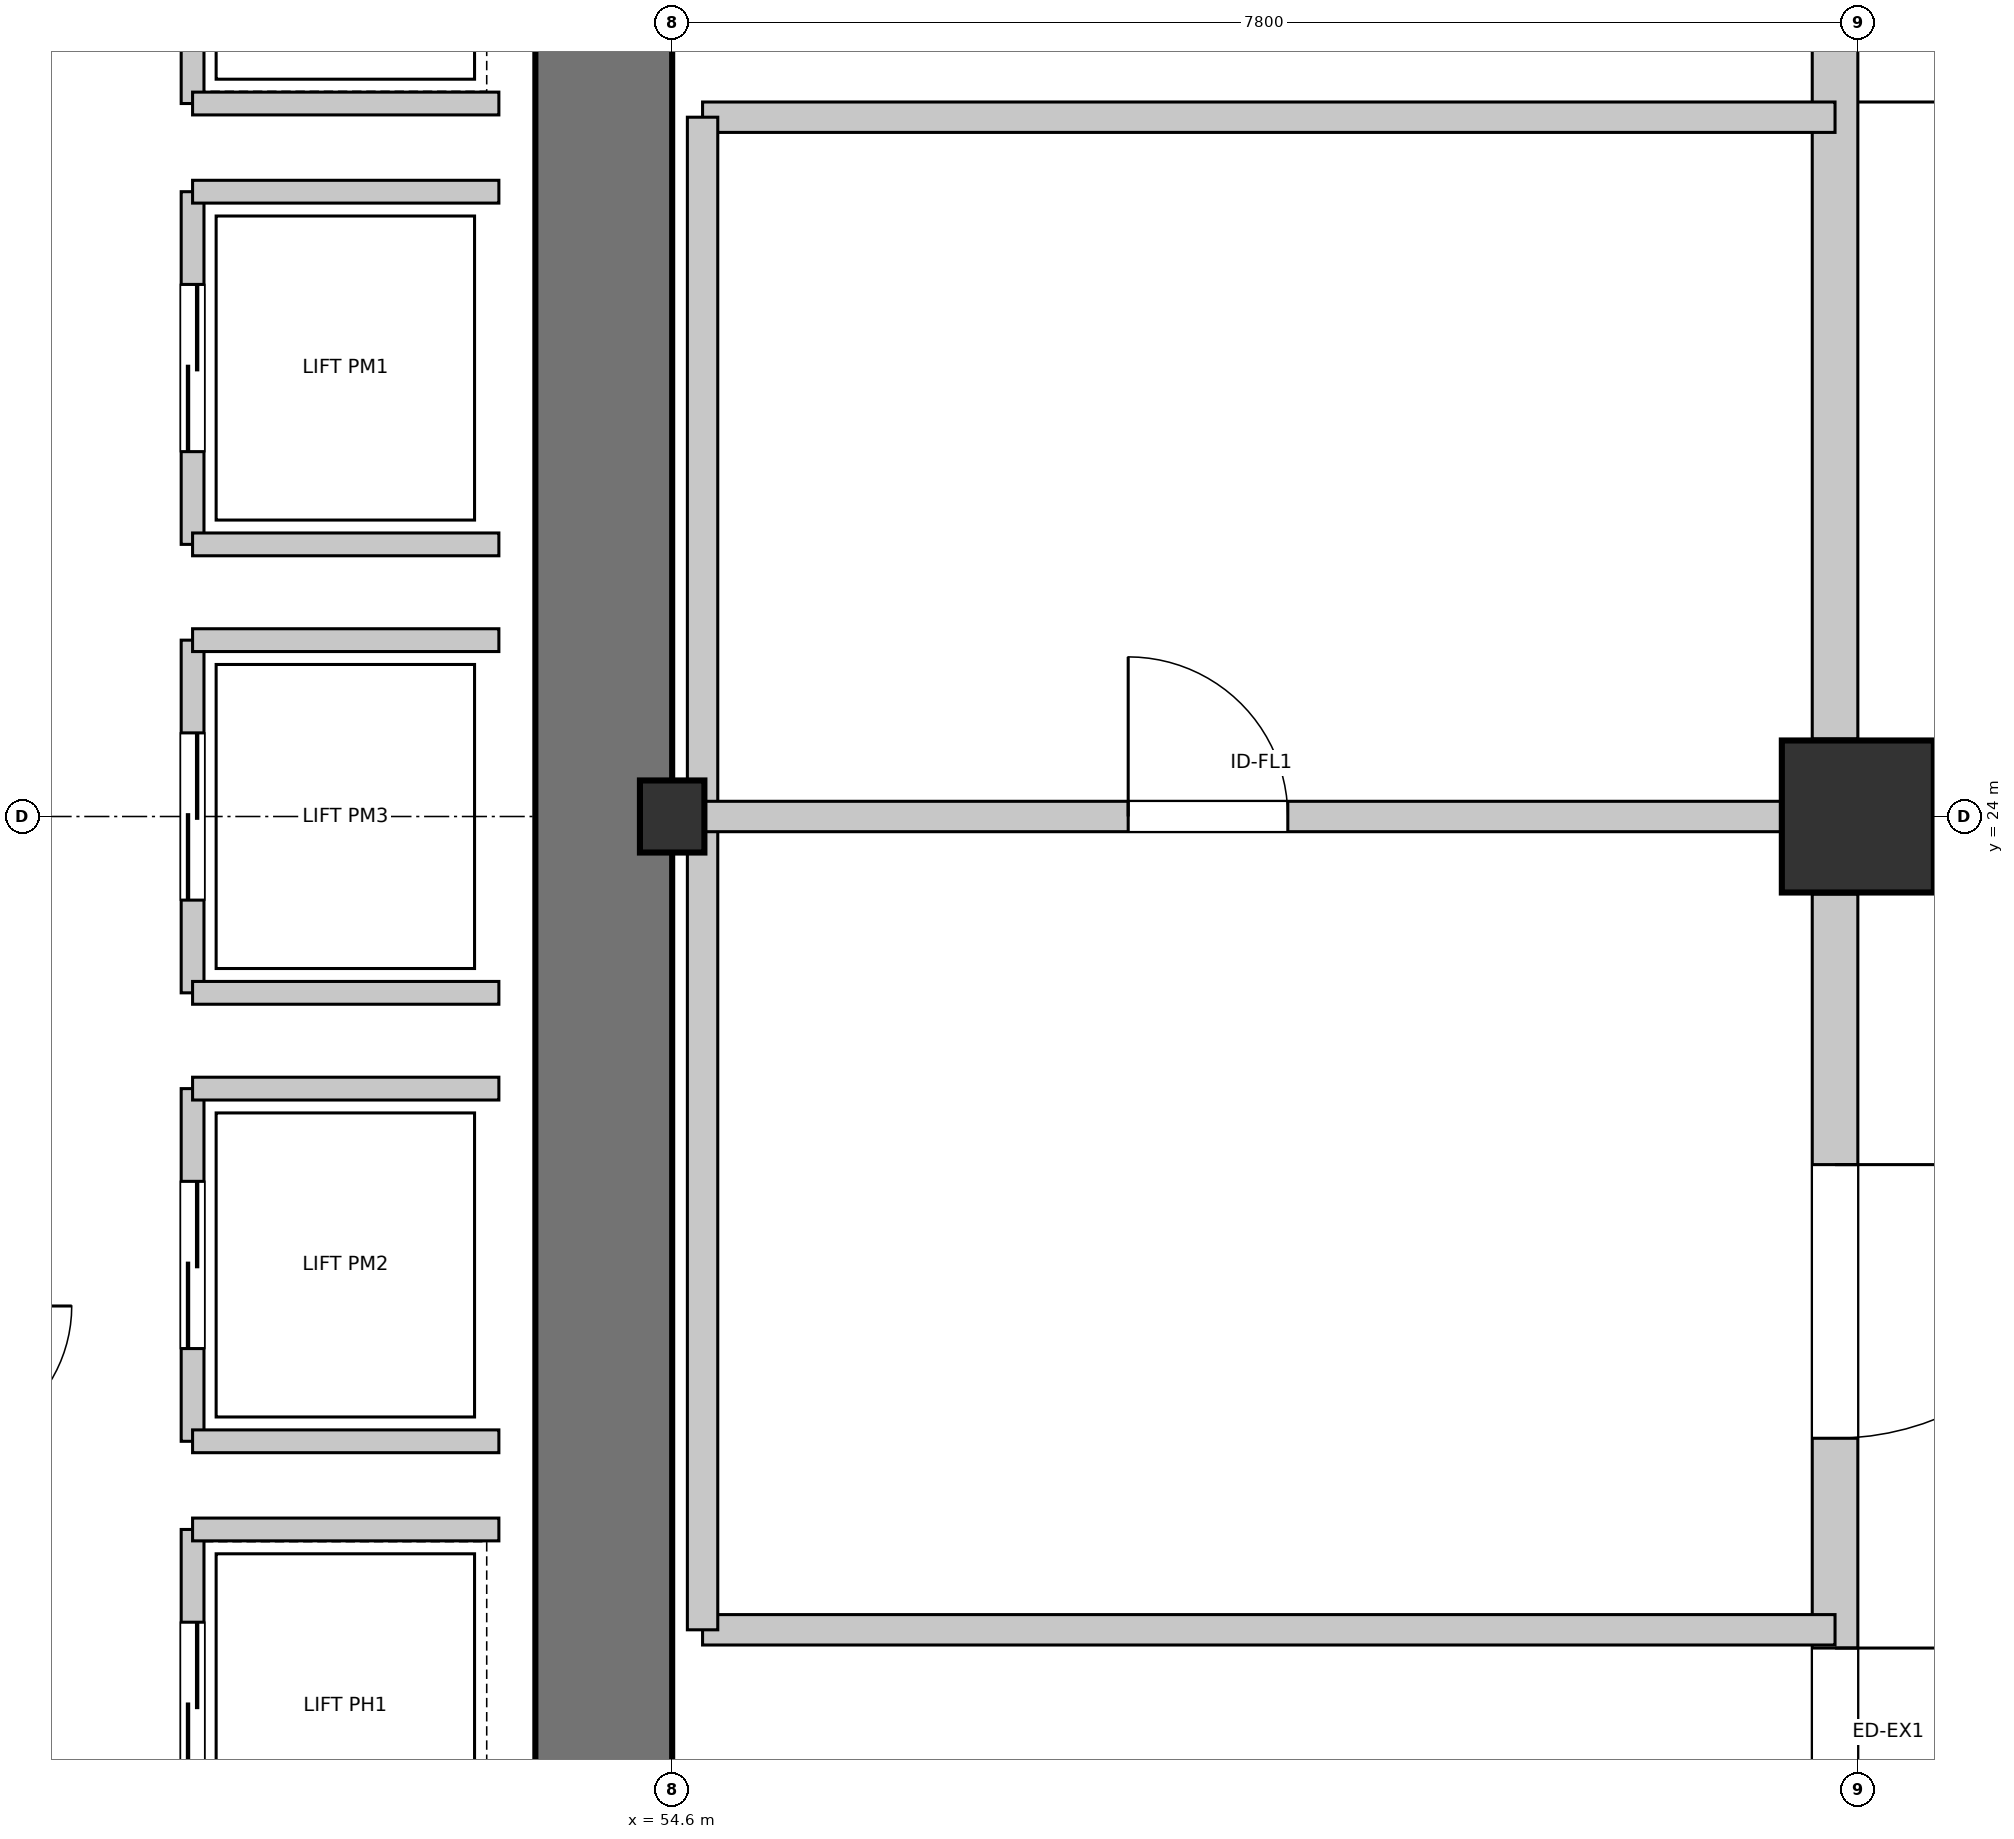
"""IFC4 building model, lengths in metres.
Left out: names, types, materials, properties, quantities, classifications, styles, units other than length and angle.
Written with IfcOpenShell. Run it as: python <this file> out.ifc"""

import sys

from ifc_helpers import new_model, si_unit, direction, frame, frame_2d, origin, origin_2d, place, context, subcontext, project, spatial, rectangle, i_section, extrude, element, fill, save


model = new_model("IFC4")
c1 = context("Model", 3, precision=1e-05, world=origin(), true_north=direction((0.0, 1.0)))
c2 = subcontext(c1, "Body", "Model", "MODEL_VIEW")
j1 = project(units=[si_unit("LENGTHUNIT", "METRE"), si_unit("PLANEANGLEUNIT", "RADIAN")], contexts=[c1])
p1 = place(None, origin())
s1 = spatial("IfcSite", under=j1, at=p1, CompositionType="ELEMENT")
p2 = place(p1, origin())
s2 = spatial("IfcBuilding", under=s1, at=p2, CompositionType="ELEMENT")
p3 = place(p2, origin())
s3 = spatial("IfcBuildingStorey", under=s2, at=p3, CompositionType="ELEMENT", Elevation=0.0)
p4 = place(p3, frame((54.15, 16.45, 0.0), z_axis=(0.0, 0.0, 1.0), x_axis=(0.0, 1.0, 0.0)))
e1 = element("IfcWall", 1, at=p4, inside=s3, PredefinedType="SHEAR", context=c2, shape_type="SweptSolid", body=[
    extrude(rectangle(XDim=15.1, YDim=0.9, at=frame_2d((7.55, 0.0))), origin(), (0.0, 0.0, 1.0), 5.12),
])
p5 = place(p3, frame((54.6, 24.0, 0.0), z_axis=(0.0, 0.0, 1.0), x_axis=(1.0, 0.0, 0.0)))
e2 = element("IfcColumn", 2, at=p5, inside=s3, PredefinedType="COLUMN", context=c2, shape_type="SweptSolid", body=[
    extrude(i_section(OverallWidth=0.424, OverallDepth=0.474, WebThickness=0.048, FlangeThickness=0.077, at=origin_2d()), origin(), (0.0, 0.0, 1.0), 5.395),
])
p6 = place(p3, frame((62.4, 24.0, 0.0), z_axis=(0.0, 0.0, 1.0), x_axis=(1.0, 0.0, 0.0)))
e3 = element("IfcColumn", 3, at=p6, inside=s3, PredefinedType="COLUMN", context=c2, shape_type="SweptSolid", body=[
    extrude(rectangle(XDim=1.0, YDim=1.0, at=origin_2d()), origin(), (0.0, 0.0, 1.0), 5.395),
])
p7 = place(p3, frame((62.25, 16.51, 0.0), z_axis=(0.0, 0.0, 1.0), x_axis=(0.0, 1.0, 0.0)))
e4 = element("IfcWall", 4, at=p7, inside=s3, PredefinedType="STANDARD", context=c2, shape_type="SweptSolid", body=[
    extrude(rectangle(XDim=6.98, YDim=0.3, at=frame_2d((3.49, 0.0))), origin(), (0.0, 0.0, 1.0), 4.648),
])
p8 = place(p7, frame((0.22, 0.0, 0.0)))
e5 = element("IfcOpeningElement", 5, at=p8, cuts=e4, PredefinedType="OPENING", context=c2, shape_type="SweptSolid", body=[
    extrude(rectangle(XDim=1.8, YDim=2.2, at=frame_2d((0.9, 1.1))), frame((0.0, 0.16, 0.0), z_axis=(0.0, -1.0, 0.0), x_axis=(1.0, 0.0, 0.0)), (0.0, 0.0, 1.0), 0.32),
])
p9 = place(p7, frame((3.4, 0.0, 0.0)))
e6 = element("IfcOpeningElement", 6, at=p9, cuts=e4, PredefinedType="OPENING", context=c2, shape_type="SweptSolid", body=[
    extrude(rectangle(XDim=1.8, YDim=2.2, at=frame_2d((0.9, 1.1))), frame((0.0, 0.16, 0.0), z_axis=(0.0, -1.0, 0.0), x_axis=(1.0, 0.0, 0.0)), (0.0, 0.0, 1.0), 0.32),
])
p10 = place(p3, frame((62.25, 24.51, 0.0), z_axis=(0.0, 0.0, 1.0), x_axis=(0.0, 1.0, 0.0)))
e7 = element("IfcWall", 7, at=p10, inside=s3, PredefinedType="STANDARD", context=c2, shape_type="SweptSolid", body=[
    extrude(rectangle(XDim=6.98, YDim=0.3, at=frame_2d((3.49, 0.0))), origin(), (0.0, 0.0, 1.0), 4.648),
])
p11 = place(p10, frame((4.55, 0.0, 0.0)))
e8 = element("IfcOpeningElement", 8, at=p11, cuts=e7, PredefinedType="OPENING", context=c2, shape_type="SweptSolid", body=[
    extrude(rectangle(XDim=1.8, YDim=2.2, at=frame_2d((0.9, 1.1))), frame((0.0, 0.16, 0.0), z_axis=(0.0, -1.0, 0.0), x_axis=(1.0, 0.0, 0.0)), (0.0, 0.0, 1.0), 0.32),
])
p12 = place(p3, frame((51.445, 28.69, 0.0), z_axis=(0.0, 0.0, 1.0), x_axis=(0.0, 1.0, 0.0)))
e9 = element("IfcWall", 9, at=p12, inside=s3, PredefinedType="PARTITIONING", context=c2, shape_type="SweptSolid", body=[
    extrude(rectangle(XDim=2.32, YDim=0.15, at=frame_2d((1.16, 0.0))), origin(), (0.0, 0.0, 1.0), 5.12),
])
p13 = place(p12, frame((0.61, 0.0, 0.0)))
e10 = element("IfcOpeningElement", 10, at=p13, cuts=e9, PredefinedType="OPENING", context=c2, shape_type="SweptSolid", body=[
    extrude(rectangle(XDim=1.1, YDim=2.15, at=frame_2d((0.55, 1.075))), frame((0.0, 0.085, 0.0), z_axis=(0.0, -1.0, 0.0), x_axis=(1.0, 0.0, 0.0)), (0.0, 0.0, 1.0), 0.17),
])
p14 = place(p3, frame((51.445, 28.69, 0.0), z_axis=(0.0, 0.0, 1.0), x_axis=(1.0, 0.0, 0.0)))
e11 = element("IfcWall", 11, at=p14, inside=s3, PredefinedType="PARTITIONING", context=c2, shape_type="SweptSolid", body=[
    extrude(rectangle(XDim=2.015, YDim=0.15, at=frame_2d((1.007, 0.0))), origin(), (0.0, 0.0, 1.0), 5.12),
])
p15 = place(p3, frame((51.445, 25.79, 0.0), z_axis=(0.0, 0.0, 1.0), x_axis=(0.0, 1.0, 0.0)))
e12 = element("IfcWall", 12, at=p15, inside=s3, PredefinedType="PARTITIONING", context=c2, shape_type="SweptSolid", body=[
    extrude(rectangle(XDim=2.32, YDim=0.15, at=frame_2d((1.16, 0.0))), origin(), (0.0, 0.0, 1.0), 5.12),
])
p16 = place(p15, frame((0.61, 0.0, 0.0)))
e13 = element("IfcOpeningElement", 13, at=p16, cuts=e12, PredefinedType="OPENING", context=c2, shape_type="SweptSolid", body=[
    extrude(rectangle(XDim=1.1, YDim=2.15, at=frame_2d((0.55, 1.075))), frame((0.0, 0.085, 0.0), z_axis=(0.0, -1.0, 0.0), x_axis=(1.0, 0.0, 0.0)), (0.0, 0.0, 1.0), 0.17),
])
for number, where, z_axis, x_axis in (
    (14, (51.445, 25.79, 0.0), (0.0, 0.0, 1.0), (1.0, 0.0, 0.0)),
    (15, (51.445, 28.11, 0.0), (0.0, 0.0, 1.0), (1.0, 0.0, 0.0)),
):
    element("IfcWall", number, at=place(p3, frame(where, z_axis=z_axis, x_axis=x_axis)), inside=s3, PredefinedType="PARTITIONING", context=c2, shape_type="SweptSolid", body=[
        extrude(rectangle(XDim=2.015, YDim=0.15, at=frame_2d((1.007, 0.0))), origin(), (0.0, 0.0, 1.0), 5.12),
    ])
p17 = place(p3, frame((51.445, 19.89, 0.0), z_axis=(0.0, 0.0, 1.0), x_axis=(0.0, 1.0, 0.0)))
e16 = element("IfcWall", 16, at=p17, inside=s3, PredefinedType="PARTITIONING", context=c2, shape_type="SweptSolid", body=[
    extrude(rectangle(XDim=2.32, YDim=0.15, at=frame_2d((1.16, 0.0))), origin(), (0.0, 0.0, 1.0), 5.12),
])
p18 = place(p17, frame((0.61, 0.0, 0.0)))
e17 = element("IfcOpeningElement", 17, at=p18, cuts=e16, PredefinedType="OPENING", context=c2, shape_type="SweptSolid", body=[
    extrude(rectangle(XDim=1.1, YDim=2.15, at=frame_2d((0.55, 1.075))), frame((0.0, 0.085, 0.0), z_axis=(0.0, -1.0, 0.0), x_axis=(1.0, 0.0, 0.0)), (0.0, 0.0, 1.0), 0.17),
])
for number, where, z_axis, x_axis in (
    (18, (51.445, 19.89, 0.0), (0.0, 0.0, 1.0), (1.0, 0.0, 0.0)),
    (19, (51.445, 22.21, 0.0), (0.0, 0.0, 1.0), (1.0, 0.0, 0.0)),
):
    element("IfcWall", number, at=place(p3, frame(where, z_axis=z_axis, x_axis=x_axis)), inside=s3, PredefinedType="PARTITIONING", context=c2, shape_type="SweptSolid", body=[
        extrude(rectangle(XDim=2.015, YDim=0.15, at=frame_2d((1.007, 0.0))), origin(), (0.0, 0.0, 1.0), 5.12),
    ])
p19 = place(p3, frame((51.445, 22.84, 0.0), z_axis=(0.0, 0.0, 1.0), x_axis=(0.0, 1.0, 0.0)))
e20 = element("IfcWall", 20, at=p19, inside=s3, PredefinedType="PARTITIONING", context=c2, shape_type="SweptSolid", body=[
    extrude(rectangle(XDim=2.32, YDim=0.15, at=frame_2d((1.16, 0.0))), origin(), (0.0, 0.0, 1.0), 5.12),
])
p20 = place(p19, frame((0.61, 0.0, 0.0)))
e21 = element("IfcOpeningElement", 21, at=p20, cuts=e20, PredefinedType="OPENING", context=c2, shape_type="SweptSolid", body=[
    extrude(rectangle(XDim=1.1, YDim=2.15, at=frame_2d((0.55, 1.075))), frame((0.0, 0.085, 0.0), z_axis=(0.0, -1.0, 0.0), x_axis=(1.0, 0.0, 0.0)), (0.0, 0.0, 1.0), 0.17),
])
for number, where, z_axis, x_axis in (
    (22, (51.445, 22.84, 0.0), (0.0, 0.0, 1.0), (1.0, 0.0, 0.0)),
    (23, (51.445, 25.16, 0.0), (0.0, 0.0, 1.0), (1.0, 0.0, 0.0)),
):
    element("IfcWall", number, at=place(p3, frame(where, z_axis=z_axis, x_axis=x_axis)), inside=s3, PredefinedType="PARTITIONING", context=c2, shape_type="SweptSolid", body=[
        extrude(rectangle(XDim=2.015, YDim=0.15, at=frame_2d((1.007, 0.0))), origin(), (0.0, 0.0, 1.0), 5.12),
    ])
p21 = place(p3, frame((51.445, 16.99, 0.0), z_axis=(0.0, 0.0, 1.0), x_axis=(0.0, 1.0, 0.0)))
e24 = element("IfcWall", 24, at=p21, inside=s3, PredefinedType="PARTITIONING", context=c2, shape_type="SweptSolid", body=[
    extrude(rectangle(XDim=2.32, YDim=0.15, at=frame_2d((1.16, 0.0))), origin(), (0.0, 0.0, 1.0), 5.12),
])
p22 = place(p21, frame((0.61, 0.0, 0.0)))
e25 = element("IfcOpeningElement", 25, at=p22, cuts=e24, PredefinedType="OPENING", context=c2, shape_type="SweptSolid", body=[
    extrude(rectangle(XDim=1.1, YDim=2.15, at=frame_2d((0.55, 1.075))), frame((0.0, 0.085, 0.0), z_axis=(0.0, -1.0, 0.0), x_axis=(1.0, 0.0, 0.0)), (0.0, 0.0, 1.0), 0.17),
])
p23 = place(p3, frame((51.445, 19.31, 0.0), z_axis=(0.0, 0.0, 1.0), x_axis=(1.0, 0.0, 0.0)))
e26 = element("IfcWall", 26, at=p23, inside=s3, PredefinedType="PARTITIONING", context=c2, shape_type="SweptSolid", body=[
    extrude(rectangle(XDim=2.015, YDim=0.15, at=frame_2d((1.007, 0.0))), origin(), (0.0, 0.0, 1.0), 5.12),
])
for number, where, z_axis, x_axis in (
    (27, (54.8, 28.6, 0.0), (0.0, 0.0, 1.0), (1.0, 0.0, 0.0)),
    (28, (54.8, 18.65, 0.0), (0.0, 0.0, 1.0), (1.0, 0.0, 0.0)),
):
    element("IfcWall", number, at=place(p3, frame(where, z_axis=z_axis, x_axis=x_axis)), inside=s3, PredefinedType="SOLIDWALL", context=c2, shape_type="SweptSolid", body=[
        extrude(rectangle(XDim=7.45, YDim=0.2, at=frame_2d((3.725, 0.0))), origin(), (0.0, 0.0, 1.0), 5.12),
    ])
p24 = place(p3, frame((54.8, 18.65, 0.0), z_axis=(0.0, 0.0, 1.0), x_axis=(0.0, 1.0, 0.0)))
e29 = element("IfcWall", 29, at=p24, inside=s3, PredefinedType="SOLIDWALL", context=c2, shape_type="SweptSolid", body=[
    extrude(rectangle(XDim=9.95, YDim=0.2, at=frame_2d((4.975, 0.0))), origin(), (0.0, 0.0, 1.0), 4.338),
])
p25 = place(p3, frame((54.8, 24.0, 0.0), z_axis=(0.0, 0.0, 1.0), x_axis=(1.0, 0.0, 0.0)))
e30 = element("IfcWall", 30, at=p25, inside=s3, PredefinedType="SOLIDWALL", context=c2, shape_type="SweptSolid", body=[
    extrude(rectangle(XDim=7.45, YDim=0.2, at=frame_2d((3.725, 0.0))), origin(), (0.0, 0.0, 1.0), 4.338),
])
p26 = place(p25, frame((2.8, 0.0, 0.0)))
e31 = element("IfcOpeningElement", 31, at=p26, cuts=e30, PredefinedType="OPENING", context=c2, shape_type="SweptSolid", body=[
    extrude(rectangle(XDim=1.05, YDim=2.15, at=frame_2d((0.525, 1.075))), frame((0.0, 0.11, 0.0), z_axis=(0.0, -1.0, 0.0), x_axis=(1.0, 0.0, 0.0)), (0.0, 0.0, 1.0), 0.22),
])
p27 = place(p8, frame((1.8, 0.0, 0.0), z_axis=(0.0, 0.0, 1.0), x_axis=(-1.0, 0.0, 0.0)))
e32 = element("IfcDoor", 32, at=p27, inside=s3, OperationType="SINGLE_SWING_LEFT", PredefinedType="DOOR", context=c2, shape_type="SweptSolid", body=[
    extrude(rectangle(XDim=1.8, YDim=2.2, at=frame_2d((0.9, 1.1))), frame((0.0, 0.025, 0.0), z_axis=(0.0, -1.0, 0.0), x_axis=(1.0, 0.0, 0.0)), (0.0, 0.0, 1.0), 0.05),
])
fill(e5, e32)
p28 = place(p9, frame((1.8, 0.0, 0.0), z_axis=(0.0, 0.0, 1.0), x_axis=(-1.0, 0.0, 0.0)))
e33 = element("IfcDoor", 33, at=p28, inside=s3, OperationType="SINGLE_SWING_LEFT", PredefinedType="DOOR", context=c2, shape_type="SweptSolid", body=[
    extrude(rectangle(XDim=1.8, YDim=2.2, at=frame_2d((0.9, 1.1))), frame((0.0, 0.025, 0.0), z_axis=(0.0, -1.0, 0.0), x_axis=(1.0, 0.0, 0.0)), (0.0, 0.0, 1.0), 0.05),
])
fill(e6, e33)
p29 = place(p16, frame((1.1, 0.0, 0.0), z_axis=(0.0, 0.0, 1.0), x_axis=(-1.0, 0.0, 0.0)))
e34 = element("IfcDoor", 34, at=p29, inside=s3, OperationType="DOUBLE_DOOR_SLIDING", PredefinedType="DOOR", context=c2, shape_type="SweptSolid", body=[
    extrude(rectangle(XDim=1.1, YDim=2.15, at=frame_2d((0.55, 1.075))), frame((0.0, 0.025, 0.0), z_axis=(0.0, -1.0, 0.0), x_axis=(1.0, 0.0, 0.0)), (0.0, 0.0, 1.0), 0.05),
])
fill(e13, e34)
p30 = place(p18, frame((1.1, 0.0, 0.0), z_axis=(0.0, 0.0, 1.0), x_axis=(-1.0, 0.0, 0.0)))
e35 = element("IfcDoor", 35, at=p30, inside=s3, OperationType="DOUBLE_DOOR_SLIDING", PredefinedType="DOOR", context=c2, shape_type="SweptSolid", body=[
    extrude(rectangle(XDim=1.1, YDim=2.15, at=frame_2d((0.55, 1.075))), frame((0.0, 0.025, 0.0), z_axis=(0.0, -1.0, 0.0), x_axis=(1.0, 0.0, 0.0)), (0.0, 0.0, 1.0), 0.05),
])
fill(e17, e35)
p31 = place(p20, frame((1.1, 0.0, 0.0), z_axis=(0.0, 0.0, 1.0), x_axis=(-1.0, 0.0, 0.0)))
e36 = element("IfcDoor", 36, at=p31, inside=s3, OperationType="DOUBLE_DOOR_SLIDING", PredefinedType="DOOR", context=c2, shape_type="SweptSolid", body=[
    extrude(rectangle(XDim=1.1, YDim=2.15, at=frame_2d((0.55, 1.075))), frame((0.0, 0.025, 0.0), z_axis=(0.0, -1.0, 0.0), x_axis=(1.0, 0.0, 0.0)), (0.0, 0.0, 1.0), 0.05),
])
fill(e21, e36)
p32 = place(p22, frame((1.1, 0.0, 0.0), z_axis=(0.0, 0.0, 1.0), x_axis=(-1.0, 0.0, 0.0)))
e37 = element("IfcDoor", 37, at=p32, inside=s3, OperationType="DOUBLE_DOOR_SLIDING", PredefinedType="DOOR", context=c2, shape_type="SweptSolid", body=[
    extrude(rectangle(XDim=1.1, YDim=2.15, at=frame_2d((0.55, 1.075))), frame((0.0, 0.025, 0.0), z_axis=(0.0, -1.0, 0.0), x_axis=(1.0, 0.0, 0.0)), (0.0, 0.0, 1.0), 0.05),
])
fill(e25, e37)
p33 = place(p26, origin())
e38 = element("IfcDoor", 38, at=p33, inside=s3, OperationType="SINGLE_SWING_LEFT", PredefinedType="DOOR", context=c2, shape_type="SweptSolid", body=[
    extrude(rectangle(XDim=1.05, YDim=2.15, at=frame_2d((0.525, 1.075))), frame((0.0, 0.025, 0.0), z_axis=(0.0, -1.0, 0.0), x_axis=(1.0, 0.0, 0.0)), (0.0, 0.0, 1.0), 0.05),
])
fill(e31, e38)
save(model, sys.argv[1])
